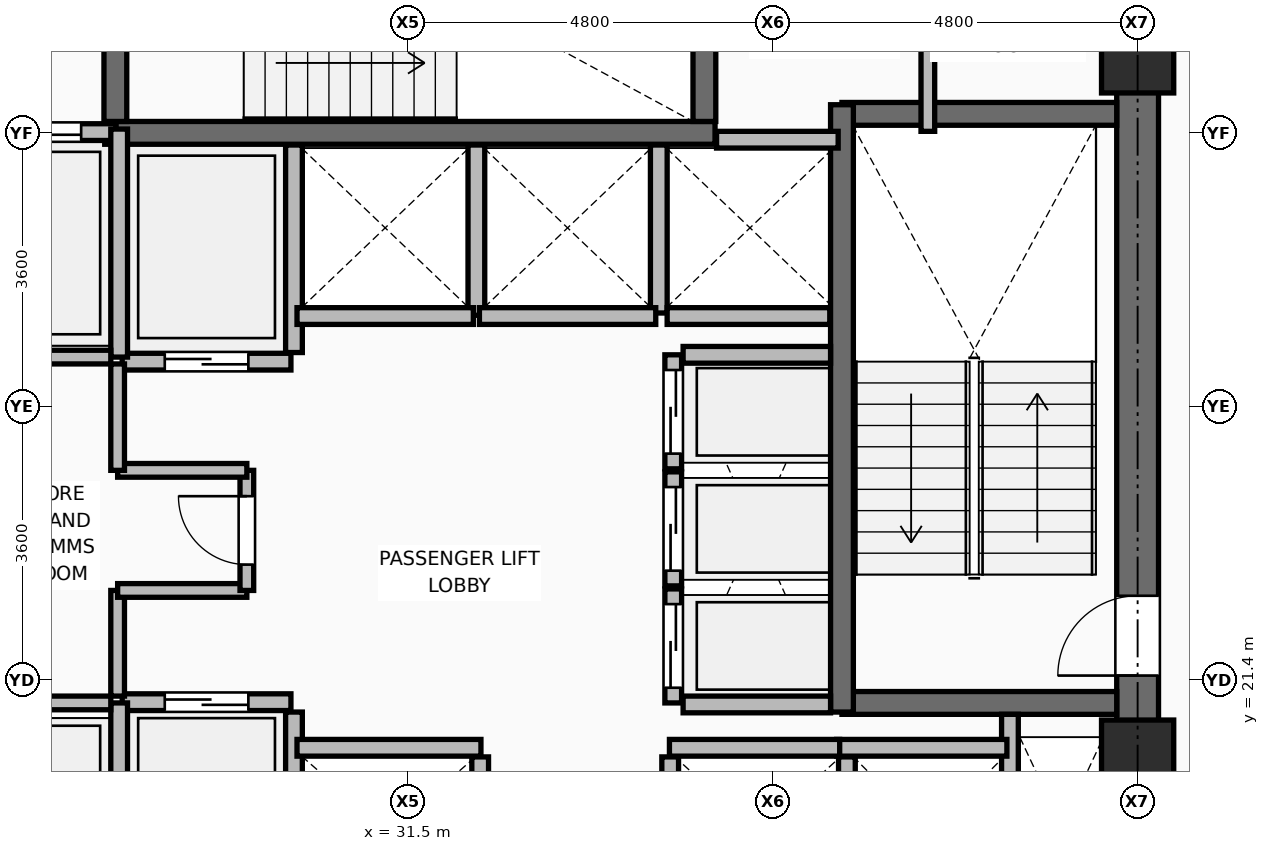
"""IFC4 building model, lengths in metres.
Left out: names, types, materials, properties, quantities, classifications, styles, units other than length and angle.
Written with IfcOpenShell. Run it as: python <this file> out.ifc"""

import sys

from ifc_helpers import new_model, si_unit, direction, frame, frame_2d, origin, origin_2d, place, context, subcontext, project, spatial, rectangle, extrude, element, fill, save


model = new_model("IFC4")
c1 = context("Model", 3, precision=1e-05, world=origin(), true_north=direction((0.0, 1.0)))
c2 = subcontext(c1, "Body", "Model", "MODEL_VIEW")
j1 = project(units=[si_unit("LENGTHUNIT", "METRE"), si_unit("PLANEANGLEUNIT", "RADIAN")], contexts=[c1])
p1 = place(None, origin())
s1 = spatial("IfcSite", under=j1, at=p1, CompositionType="ELEMENT")
p2 = place(p1, origin())
s2 = spatial("IfcBuilding", under=s1, at=p2, CompositionType="ELEMENT")
p3 = place(p2, frame((0.0, 0.0, 168.45)))
s3 = spatial("IfcBuildingStorey", under=s2, at=p3, CompositionType="ELEMENT", Elevation=168.45)
for number, where, z_axis, x_axis in (
    (1, (41.1, 20.4, 0.0), (0.0, 0.0, 1.0), (1.0, 0.0, 0.0)),
    (2, (41.1, 29.6, 0.0), (0.0, 0.0, 1.0), (1.0, 0.0, 0.0)),
):
    element("IfcColumn", number, at=place(p3, frame(where, z_axis=z_axis, x_axis=x_axis)), inside=s3, PredefinedType="COLUMN", context=c2, shape_type="SweptSolid", body=[
        extrude(rectangle(XDim=0.95, YDim=0.95, at=origin_2d()), origin(), (0.0, 0.0, 1.0), 3.75),
    ])
p4 = place(p3, frame((30.0, 18.08, 0.0), z_axis=(0.0, 0.0, 1.0), x_axis=(0.0, 1.0, 0.0)))
e3 = element("IfcWall", 3, at=p4, inside=s3, PredefinedType="PARTITIONING", context=c2, shape_type="SweptSolid", body=[
    extrude(rectangle(XDim=2.9, YDim=0.22, at=frame_2d((1.45, 0.0))), origin(), (0.0, 0.0, 1.0), 3.545),
])
for number, where, z_axis, x_axis in (
    (4, (32.45, 17.92, 0.0), (0.0, 0.0, 1.0), (0.0, 1.0, 0.0)),
    (5, (34.95, 17.92, 0.0), (0.0, 0.0, 1.0), (0.0, 1.0, 0.0)),
):
    element("IfcWall", number, at=place(p3, frame(where, z_axis=z_axis, x_axis=x_axis)), inside=s3, PredefinedType="PARTITIONING", context=c2, shape_type="SweptSolid", body=[
        extrude(rectangle(XDim=2.47, YDim=0.22, at=frame_2d((1.235, 0.0))), origin(), (0.0, 0.0, 1.0), 3.006),
    ])
p5 = place(p3, frame((37.275, 18.08, 0.0), z_axis=(0.0, 0.0, 1.0), x_axis=(0.0, 1.0, 0.0)))
e6 = element("IfcWall", 6, at=p5, inside=s3, PredefinedType="PARTITIONING", context=c2, shape_type="SweptSolid", body=[
    extrude(rectangle(XDim=2.31, YDim=0.22, at=frame_2d((1.155, 0.0))), origin(), (0.0, 0.0, 1.0), 3.545),
])
p6 = place(p3, frame((30.0, 25.71, 0.0), z_axis=(0.0, 0.0, 1.0), x_axis=(0.0, 1.0, 0.0)))
e7 = element("IfcWall", 7, at=p6, inside=s3, PredefinedType="PARTITIONING", context=c2, shape_type="SweptSolid", body=[
    extrude(rectangle(XDim=2.73, YDim=0.22, at=frame_2d((1.365, 0.0))), origin(), (0.0, 0.0, 1.0), 3.545),
])
p7 = place(p3, frame((32.4, 26.2, 0.0), z_axis=(0.0, 0.0, 1.0), x_axis=(0.0, 1.0, 0.0)))
e8 = element("IfcWall", 8, at=p7, inside=s3, PredefinedType="PARTITIONING", context=c2, shape_type="SweptSolid", body=[
    extrude(rectangle(XDim=2.24, YDim=0.22, at=frame_2d((1.12, 0.0))), origin(), (0.0, 0.0, 1.0), 3.545),
])
p8 = place(p3, frame((34.8, 26.23, 0.0), z_axis=(0.0, 0.0, 1.0), x_axis=(0.0, 1.0, 0.0)))
e9 = element("IfcWall", 9, at=p8, inside=s3, PredefinedType="PARTITIONING", context=c2, shape_type="SweptSolid", body=[
    extrude(rectangle(XDim=2.21, YDim=0.22, at=frame_2d((1.105, 0.0))), origin(), (0.0, 0.0, 1.0), 3.545),
])
p9 = place(p3, frame((34.91, 26.19, 0.0), z_axis=(0.0, 0.0, 1.0), x_axis=(1.0, 0.0, 0.0)))
e10 = element("IfcWall", 10, at=p9, inside=s3, PredefinedType="PARTITIONING", context=c2, shape_type="SweptSolid", body=[
    extrude(rectangle(XDim=2.14, YDim=0.22, at=frame_2d((1.07, 0.0))), origin(), (0.0, 0.0, 1.0), 3.545),
])
p10 = place(p3, frame((41.1, 18.075, 0.0), z_axis=(0.0, 0.0, 1.0), x_axis=(0.0, 1.0, 0.0)))
e11 = element("IfcWall", 11, at=p10, inside=s3, PredefinedType="SHEAR", context=c2, shape_type="SweptSolid", body=[
    extrude(rectangle(XDim=14.1, YDim=0.55, at=frame_2d((7.05, 0.0))), origin(), (0.0, 0.0, 1.0), 3.57),
])
p11 = place(p10, frame((3.385, 0.0, 0.0)))
e12 = element("IfcOpeningElement", 12, at=p11, cuts=e11, PredefinedType="OPENING", context=c2, shape_type="SweptSolid", body=[
    extrude(rectangle(XDim=1.05, YDim=2.1, at=frame_2d((0.525, 1.05))), frame((0.0, 0.285, 0.0), z_axis=(0.0, -1.0, 0.0), x_axis=(1.0, 0.0, 0.0)), (0.0, 0.0, 1.0), 0.57),
])
for number, where, z_axis, x_axis in (
    (13, (37.21, 21.1, 0.0), (0.0, 0.0, 1.0), (1.0, 0.0, 0.0)),
    (14, (37.21, 28.85, 0.0), (0.0, 0.0, 1.0), (1.0, 0.0, 0.0)),
):
    element("IfcWall", number, at=place(p3, frame(where, z_axis=z_axis, x_axis=x_axis)), inside=s3, PredefinedType="SHEAR", context=c2, shape_type="SweptSolid", body=[
        extrude(rectangle(XDim=3.615, YDim=0.3, at=frame_2d((1.808, 0.0))), origin(), (0.0, 0.0, 1.0), 3.57),
    ])
p12 = place(p3, frame((37.21, 20.98, 0.0), z_axis=(0.0, 0.0, 1.0), x_axis=(0.0, 1.0, 0.0)))
e15 = element("IfcWall", 15, at=p12, inside=s3, PredefinedType="SHEAR", context=c2, shape_type="SweptSolid", body=[
    extrude(rectangle(XDim=7.99, YDim=0.3, at=frame_2d((3.995, 0.0))), origin(), (0.0, 0.0, 1.0), 3.57),
])
p13 = place(p3, frame((27.51, 28.6, 0.0), z_axis=(0.0, 0.0, 1.0), x_axis=(1.0, 0.0, 0.0)))
e16 = element("IfcWall", 16, at=p13, inside=s3, PredefinedType="SHEAR", context=c2, shape_type="SweptSolid", body=[
    extrude(rectangle(XDim=8.03, YDim=0.3, at=frame_2d((4.015, 0.0))), origin(), (0.0, 0.0, 1.0), 3.57),
])
p14 = place(p3, frame((27.65, 28.75, 0.0), z_axis=(0.0, 0.0, 1.0), x_axis=(0.0, 1.0, 0.0)))
e17 = element("IfcWall", 17, at=p14, inside=s3, PredefinedType="SHEAR", context=c2, shape_type="SweptSolid", body=[
    extrude(rectangle(XDim=3.425, YDim=0.3, at=frame_2d((1.712, 0.0))), origin(), (0.0, 0.0, 1.0), 3.57),
])
p15 = place(p14, frame((1.0, 0.0, 0.0)))
e18 = element("IfcOpeningElement", 18, at=p15, cuts=e17, PredefinedType="OPENING", context=c2, shape_type="SweptSolid", body=[
    extrude(rectangle(XDim=1.05, YDim=2.1, at=frame_2d((0.525, 1.05))), frame((0.0, 0.16, 0.0), z_axis=(0.0, -1.0, 0.0), x_axis=(1.0, 0.0, 0.0)), (0.0, 0.0, 1.0), 0.32),
])
p16 = place(p3, frame((35.4, 28.75, 0.0), z_axis=(0.0, 0.0, 1.0), x_axis=(0.0, 1.0, 0.0)))
e19 = element("IfcWall", 19, at=p16, inside=s3, PredefinedType="SHEAR", context=c2, shape_type="SweptSolid", body=[
    extrude(rectangle(XDim=3.425, YDim=0.3, at=frame_2d((1.712, 0.0))), origin(), (0.0, 0.0, 1.0), 3.57),
])
p17 = place(p3, frame((39.42, 18.075, 0.0), z_axis=(0.0, 0.0, 1.0), x_axis=(0.0, 1.0, 0.0)))
e20 = element("IfcWall", 20, at=p17, inside=s3, PredefinedType="PARTITIONING", context=c2, shape_type="SweptSolid", body=[
    extrude(rectangle(XDim=2.875, YDim=0.22, at=frame_2d((1.438, 0.0))), origin(), (0.0, 0.0, 1.0), 3.55),
])
p18 = place(p3, frame((25.64, 28.61, 0.0), z_axis=(0.0, 0.0, 1.0), x_axis=(1.0, 0.0, 0.0)))
e21 = element("IfcWall", 21, at=p18, inside=s3, PredefinedType="PARTITIONING", context=c2, shape_type="SweptSolid", body=[
    extrude(rectangle(XDim=2.02, YDim=0.22, at=frame_2d((1.01, 0.0))), origin(), (0.0, 0.0, 1.0), 3.55),
])
p19 = place(p18, frame((0.46, 0.0, 0.0)))
e22 = element("IfcOpeningElement", 22, at=p19, cuts=e21, PredefinedType="OPENING", context=c2, shape_type="SweptSolid", body=[
    extrude(rectangle(XDim=1.1, YDim=2.2, at=frame_2d((0.55, 1.1))), frame((0.0, 0.12, 0.0), z_axis=(0.0, -1.0, 0.0), x_axis=(1.0, 0.0, 0.0)), (0.0, 0.0, 1.0), 0.24),
])
p20 = place(p3, frame((27.74, 21.11, 0.0), z_axis=(0.0, 0.0, 1.0), x_axis=(1.0, 0.0, 0.0)))
e23 = element("IfcWall", 23, at=p20, inside=s3, PredefinedType="PARTITIONING", context=c2, shape_type="SweptSolid", body=[
    extrude(rectangle(XDim=2.22, YDim=0.22, at=frame_2d((1.11, 0.0))), origin(), (0.0, 0.0, 1.0), 3.55),
])
p21 = place(p20, frame((0.56, 0.0, 0.0)))
e24 = element("IfcOpeningElement", 24, at=p21, cuts=e23, PredefinedType="OPENING", context=c2, shape_type="SweptSolid", body=[
    extrude(rectangle(XDim=1.1, YDim=2.2, at=frame_2d((0.55, 1.1))), frame((0.0, 0.12, 0.0), z_axis=(0.0, -1.0, 0.0), x_axis=(1.0, 0.0, 0.0)), (0.0, 0.0, 1.0), 0.24),
])
p22 = place(p3, frame((27.74, 25.59, 0.0), z_axis=(0.0, 0.0, 1.0), x_axis=(1.0, 0.0, 0.0)))
e25 = element("IfcWall", 25, at=p22, inside=s3, PredefinedType="PARTITIONING", context=c2, shape_type="SweptSolid", body=[
    extrude(rectangle(XDim=2.22, YDim=0.22, at=frame_2d((1.11, 0.0))), origin(), (0.0, 0.0, 1.0), 3.55),
])
p23 = place(p22, frame((0.56, 0.0, 0.0)))
e26 = element("IfcOpeningElement", 26, at=p23, cuts=e25, PredefinedType="OPENING", context=c2, shape_type="SweptSolid", body=[
    extrude(rectangle(XDim=1.1, YDim=2.2, at=frame_2d((0.55, 1.1))), frame((0.0, 0.12, 0.0), z_axis=(0.0, -1.0, 0.0), x_axis=(1.0, 0.0, 0.0)), (0.0, 0.0, 1.0), 0.24),
])
p24 = place(p3, frame((30.04, 20.51, 0.0), z_axis=(0.0, 0.0, 1.0), x_axis=(1.0, 0.0, 0.0)))
e27 = element("IfcWall", 27, at=p24, inside=s3, PredefinedType="PARTITIONING", context=c2, shape_type="SweptSolid", body=[
    extrude(rectangle(XDim=2.42, YDim=0.22, at=frame_2d((1.21, 0.0))), origin(), (0.0, 0.0, 1.0), 3.55),
])
for number, where, z_axis, x_axis in (
    (28, (37.14, 20.51, 0.0), (0.0, 0.0, 1.0), (1.0, 0.0, 0.0)),
    (29, (34.94, 20.51, 0.0), (0.0, 0.0, 1.0), (1.0, 0.0, 0.0)),
):
    element("IfcWall", number, at=place(p3, frame(where, z_axis=z_axis, x_axis=x_axis)), inside=s3, PredefinedType="PARTITIONING", context=c2, shape_type="SweptSolid", body=[
        extrude(rectangle(XDim=2.24, YDim=0.22, at=frame_2d((1.12, 0.0))), origin(), (0.0, 0.0, 1.0), 3.55),
    ])
for number, where, z_axis, x_axis in (
    (30, (30.04, 26.19, 0.0), (0.0, 0.0, 1.0), (1.0, 0.0, 0.0)),
    (31, (32.44, 26.19, 0.0), (0.0, 0.0, 1.0), (1.0, 0.0, 0.0)),
):
    element("IfcWall", number, at=place(p3, frame(where, z_axis=z_axis, x_axis=x_axis)), inside=s3, PredefinedType="PARTITIONING", context=c2, shape_type="SweptSolid", body=[
        extrude(rectangle(XDim=2.32, YDim=0.22, at=frame_2d((1.16, 0.0))), origin(), (0.0, 0.0, 1.0), 3.55),
    ])
p25 = place(p3, frame((35.56, 28.51, 0.0), z_axis=(0.0, 0.0, 1.0), x_axis=(1.0, 0.0, 0.0)))
e32 = element("IfcWall", 32, at=p25, inside=s3, PredefinedType="PARTITIONING", context=c2, shape_type="SweptSolid", body=[
    extrude(rectangle(XDim=1.6, YDim=0.22, at=frame_2d((0.8, 0.0))), origin(), (0.0, 0.0, 1.0), 3.55),
])
p26 = place(p3, frame((34.99, 21.1, 0.0), z_axis=(0.0, 0.0, 1.0), x_axis=(0.0, 1.0, 0.0)))
e33 = element("IfcWall", 33, at=p26, inside=s3, PredefinedType="PARTITIONING", context=c2, shape_type="SweptSolid", body=[
    extrude(rectangle(XDim=1.5, YDim=0.22, at=frame_2d((0.75, 0.0))), origin(), (0.0, 0.0, 1.0), 3.55),
])
p27 = place(p26, frame((0.2, 0.0, 0.0)))
e34 = element("IfcOpeningElement", 34, at=p27, cuts=e33, PredefinedType="OPENING", context=c2, shape_type="SweptSolid", body=[
    extrude(rectangle(XDim=1.1, YDim=2.2, at=frame_2d((0.55, 1.1))), frame((0.0, 0.12, 0.0), z_axis=(0.0, -1.0, 0.0), x_axis=(1.0, 0.0, 0.0)), (0.0, 0.0, 1.0), 0.24),
])
p28 = place(p3, frame((34.99, 22.64, 0.0), z_axis=(0.0, 0.0, 1.0), x_axis=(0.0, 1.0, 0.0)))
e35 = element("IfcWall", 35, at=p28, inside=s3, PredefinedType="PARTITIONING", context=c2, shape_type="SweptSolid", body=[
    extrude(rectangle(XDim=1.5, YDim=0.22, at=frame_2d((0.75, 0.0))), origin(), (0.0, 0.0, 1.0), 3.55),
])
p29 = place(p28, frame((0.2, 0.0, 0.0)))
e36 = element("IfcOpeningElement", 36, at=p29, cuts=e35, PredefinedType="OPENING", context=c2, shape_type="SweptSolid", body=[
    extrude(rectangle(XDim=1.1, YDim=2.2, at=frame_2d((0.55, 1.1))), frame((0.0, 0.12, 0.0), z_axis=(0.0, -1.0, 0.0), x_axis=(1.0, 0.0, 0.0)), (0.0, 0.0, 1.0), 0.24),
])
p30 = place(p3, frame((34.99, 24.18, 0.0), z_axis=(0.0, 0.0, 1.0), x_axis=(0.0, 1.0, 0.0)))
e37 = element("IfcWall", 37, at=p30, inside=s3, PredefinedType="PARTITIONING", context=c2, shape_type="SweptSolid", body=[
    extrude(rectangle(XDim=1.5, YDim=0.22, at=frame_2d((0.75, 0.0))), origin(), (0.0, 0.0, 1.0), 3.55),
])
p31 = place(p30, frame((0.2, 0.0, 0.0)))
e38 = element("IfcOpeningElement", 38, at=p31, cuts=e37, PredefinedType="OPENING", context=c2, shape_type="SweptSolid", body=[
    extrude(rectangle(XDim=1.1, YDim=2.2, at=frame_2d((0.55, 1.1))), frame((0.0, 0.12, 0.0), z_axis=(0.0, -1.0, 0.0), x_axis=(1.0, 0.0, 0.0)), (0.0, 0.0, 1.0), 0.24),
])
p32 = place(p3, frame((27.7, 18.15, 0.0), z_axis=(0.0, 0.0, 1.0), x_axis=(0.0, 1.0, 0.0)))
e39 = element("IfcWall", 39, at=p32, inside=s3, PredefinedType="PARTITIONING", context=c2, shape_type="SweptSolid", body=[
    extrude(rectangle(XDim=2.95, YDim=0.22, at=frame_2d((1.475, 0.0))), origin(), (0.0, 0.0, 1.0), 3.55),
])
p33 = place(p3, frame((27.7, 25.65, 0.0), z_axis=(0.0, 0.0, 1.0), x_axis=(0.0, 1.0, 0.0)))
e40 = element("IfcWall", 40, at=p33, inside=s3, PredefinedType="PARTITIONING", context=c2, shape_type="SweptSolid", body=[
    extrude(rectangle(XDim=3.0, YDim=0.22, at=frame_2d((1.5, 0.0))), origin(), (0.0, 0.0, 1.0), 3.55),
])
for number, where, z_axis, x_axis in (
    (41, (35.12, 21.08, 0.0), (0.0, 0.0, 1.0), (1.0, 0.0, 0.0)),
    (42, (35.12, 25.68, 0.0), (0.0, 0.0, 1.0), (1.0, 0.0, 0.0)),
):
    element("IfcWall", number, at=place(p3, frame(where, z_axis=z_axis, x_axis=x_axis)), inside=s3, PredefinedType="PARTITIONING", context=c2, shape_type="SweptSolid", body=[
        extrude(rectangle(XDim=1.94, YDim=0.22, at=frame_2d((0.97, 0.0))), origin(), (0.0, 0.0, 1.0), 3.55),
    ])
for number, where, z_axis, x_axis in (
    (43, (25.89, 21.1, 0.0), (0.0, 0.0, 1.0), (1.0, 0.0, 0.0)),
    (44, (25.89, 25.65, 0.0), (0.0, 0.0, 1.0), (1.0, 0.0, 0.0)),
):
    element("IfcWall", number, at=place(p3, frame(where, z_axis=z_axis, x_axis=x_axis)), inside=s3, PredefinedType="PARTITIONING", context=c2, shape_type="SweptSolid", body=[
        extrude(rectangle(XDim=1.7, YDim=0.18, at=frame_2d((0.85, 0.0))), origin(), (0.0, 0.0, 1.0), 3.55),
    ])
p34 = place(p3, frame((27.68, 21.19, 0.0), z_axis=(0.0, 0.0, 1.0), x_axis=(0.0, 1.0, 0.0)))
e45 = element("IfcWall", 45, at=p34, inside=s3, PredefinedType="PARTITIONING", context=c2, shape_type="SweptSolid", body=[
    extrude(rectangle(XDim=1.39, YDim=0.18, at=frame_2d((0.695, 0.0))), origin(), (0.0, 0.0, 1.0), 3.55),
])
p35 = place(p3, frame((27.68, 22.58, 0.0), z_axis=(0.0, 0.0, 1.0), x_axis=(1.0, 0.0, 0.0)))
e46 = element("IfcWall", 46, at=p35, inside=s3, PredefinedType="PARTITIONING", context=c2, shape_type="SweptSolid", body=[
    extrude(rectangle(XDim=1.7, YDim=0.18, at=frame_2d((0.85, 0.0))), origin(), (0.0, 0.0, 1.0), 3.55),
])
p36 = place(p3, frame((29.38, 22.58, 0.0), z_axis=(0.0, 0.0, 1.0), x_axis=(0.0, 1.0, 0.0)))
e47 = element("IfcWall", 47, at=p36, inside=s3, PredefinedType="PARTITIONING", context=c2, shape_type="SweptSolid", body=[
    extrude(rectangle(XDim=1.58, YDim=0.18, at=frame_2d((0.79, 0.0))), origin(), (0.0, 0.0, 1.0), 3.55),
])
p37 = place(p36, frame((0.34, 0.0, 0.0)))
e48 = element("IfcOpeningElement", 48, at=p37, cuts=e47, PredefinedType="OPENING", context=c2, shape_type="SweptSolid", body=[
    extrude(rectangle(XDim=0.9, YDim=2.1, at=frame_2d((0.45, 1.05))), frame((0.0, 0.1, 0.0), z_axis=(0.0, -1.0, 0.0), x_axis=(1.0, 0.0, 0.0)), (0.0, 0.0, 1.0), 0.2),
])
p38 = place(p3, frame((27.68, 24.16, 0.0), z_axis=(0.0, 0.0, 1.0), x_axis=(1.0, 0.0, 0.0)))
e49 = element("IfcWall", 49, at=p38, inside=s3, PredefinedType="PARTITIONING", context=c2, shape_type="SweptSolid", body=[
    extrude(rectangle(XDim=1.7, YDim=0.18, at=frame_2d((0.85, 0.0))), origin(), (0.0, 0.0, 1.0), 3.55),
])
p39 = place(p3, frame((27.68, 24.16, 0.0), z_axis=(0.0, 0.0, 1.0), x_axis=(0.0, 1.0, 0.0)))
e50 = element("IfcWall", 50, at=p39, inside=s3, PredefinedType="PARTITIONING", context=c2, shape_type="SweptSolid", body=[
    extrude(rectangle(XDim=1.4, YDim=0.18, at=frame_2d((0.7, 0.0))), origin(), (0.0, 0.0, 1.0), 3.55),
])
p40 = place(p3, frame((38.34, 28.62, 0.0), z_axis=(0.0, 0.0, 1.0), x_axis=(0.0, 1.0, 0.0)))
e51 = element("IfcWall", 51, at=p40, inside=s3, PredefinedType="PARTITIONING", context=c2, shape_type="SweptSolid", body=[
    extrude(rectangle(XDim=3.555, YDim=0.18, at=frame_2d((1.777, 0.0))), origin(), (0.0, 0.0, 1.0), 3.55),
])
p41 = place(p11, origin())
e52 = element("IfcDoor", 52, at=p41, inside=s3, OperationType="SINGLE_SWING_LEFT", PredefinedType="DOOR", context=c2, shape_type="SweptSolid", body=[
    extrude(rectangle(XDim=1.05, YDim=2.1, at=frame_2d((0.525, 1.05))), frame((0.0, 0.025, 0.0), z_axis=(0.0, -1.0, 0.0), x_axis=(1.0, 0.0, 0.0)), (0.0, 0.0, 1.0), 0.05),
])
fill(e12, e52)
p42 = place(p19, origin())
e53 = element("IfcDoor", 53, at=p42, inside=s3, OperationType="DOUBLE_DOOR_SLIDING", PredefinedType="DOOR", context=c2, shape_type="SweptSolid", body=[
    extrude(rectangle(XDim=1.1, YDim=2.2, at=frame_2d((0.55, 1.1))), frame((0.0, 0.025, 0.0), z_axis=(0.0, -1.0, 0.0), x_axis=(1.0, 0.0, 0.0)), (0.0, 0.0, 1.0), 0.05),
])
fill(e22, e53)
p43 = place(p21, origin())
e54 = element("IfcDoor", 54, at=p43, inside=s3, OperationType="DOUBLE_DOOR_SLIDING", PredefinedType="DOOR", context=c2, shape_type="SweptSolid", body=[
    extrude(rectangle(XDim=1.1, YDim=2.2, at=frame_2d((0.55, 1.1))), frame((0.0, 0.025, 0.0), z_axis=(0.0, -1.0, 0.0), x_axis=(1.0, 0.0, 0.0)), (0.0, 0.0, 1.0), 0.05),
])
fill(e24, e54)
p44 = place(p23, frame((1.1, 0.0, 0.0), z_axis=(0.0, 0.0, 1.0), x_axis=(-1.0, 0.0, 0.0)))
e55 = element("IfcDoor", 55, at=p44, inside=s3, OperationType="DOUBLE_DOOR_SLIDING", PredefinedType="DOOR", context=c2, shape_type="SweptSolid", body=[
    extrude(rectangle(XDim=1.1, YDim=2.2, at=frame_2d((0.55, 1.1))), frame((0.0, 0.025, 0.0), z_axis=(0.0, -1.0, 0.0), x_axis=(1.0, 0.0, 0.0)), (0.0, 0.0, 1.0), 0.05),
])
fill(e26, e55)
p45 = place(p27, origin())
e56 = element("IfcDoor", 56, at=p45, inside=s3, OperationType="DOUBLE_DOOR_SLIDING", PredefinedType="DOOR", context=c2, shape_type="SweptSolid", body=[
    extrude(rectangle(XDim=1.1, YDim=2.2, at=frame_2d((0.55, 1.1))), frame((0.0, 0.025, 0.0), z_axis=(0.0, -1.0, 0.0), x_axis=(1.0, 0.0, 0.0)), (0.0, 0.0, 1.0), 0.05),
])
fill(e34, e56)
p46 = place(p29, origin())
e57 = element("IfcDoor", 57, at=p46, inside=s3, OperationType="DOUBLE_DOOR_SLIDING", PredefinedType="DOOR", context=c2, shape_type="SweptSolid", body=[
    extrude(rectangle(XDim=1.1, YDim=2.2, at=frame_2d((0.55, 1.1))), frame((0.0, 0.025, 0.0), z_axis=(0.0, -1.0, 0.0), x_axis=(1.0, 0.0, 0.0)), (0.0, 0.0, 1.0), 0.05),
])
fill(e36, e57)
p47 = place(p31, origin())
e58 = element("IfcDoor", 58, at=p47, inside=s3, OperationType="DOUBLE_DOOR_SLIDING", PredefinedType="DOOR", context=c2, shape_type="SweptSolid", body=[
    extrude(rectangle(XDim=1.1, YDim=2.2, at=frame_2d((0.55, 1.1))), frame((0.0, 0.025, 0.0), z_axis=(0.0, -1.0, 0.0), x_axis=(1.0, 0.0, 0.0)), (0.0, 0.0, 1.0), 0.05),
])
fill(e38, e58)
p48 = place(p37, origin())
e59 = element("IfcDoor", 59, at=p48, inside=s3, OperationType="SINGLE_SWING_RIGHT", PredefinedType="DOOR", context=c2, shape_type="SweptSolid", body=[
    extrude(rectangle(XDim=0.9, YDim=2.1, at=frame_2d((0.45, 1.05))), frame((0.0, 0.025, 0.0), z_axis=(0.0, -1.0, 0.0), x_axis=(1.0, 0.0, 0.0)), (0.0, 0.0, 1.0), 0.05),
])
fill(e48, e59)
save(model, sys.argv[1])
